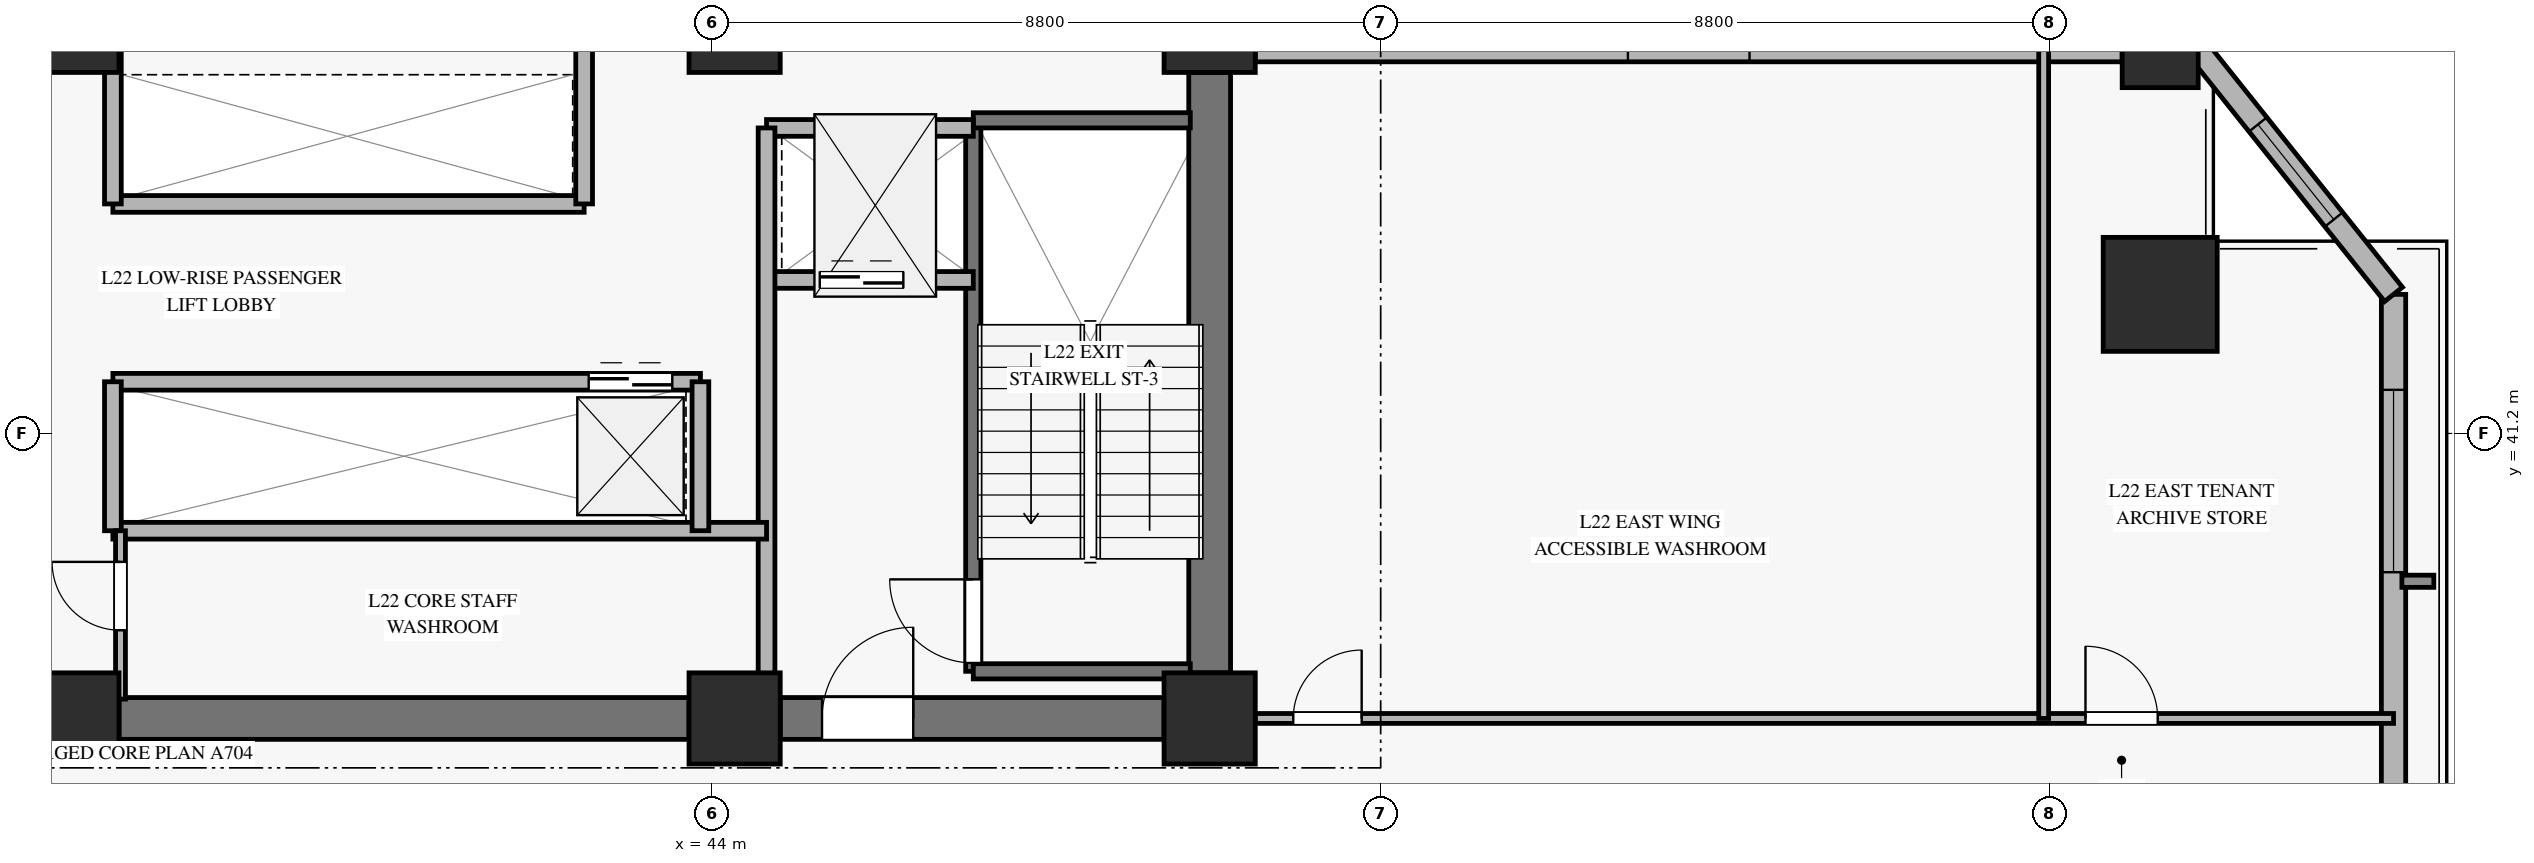
"""IFC4 building model, lengths in metres.
Left out: names, types, materials, properties, quantities, classifications, styles, units other than length and angle.
Written with IfcOpenShell. Run it as: python <this file> out.ifc"""

import sys

from ifc_helpers import new_model, si_unit, direction, frame, frame_2d, origin, origin_2d, place, context, subcontext, project, spatial, rectangle, hollow_rectangle, extrude, source, transform, mapped, element, fill, save


model = new_model("IFC4")
c1 = context("Model", 3, precision=1e-05, world=origin(), true_north=direction((0.0, 1.0)))
c2 = subcontext(c1, "Body", "Model", "MODEL_VIEW")
j1 = project(units=[si_unit("LENGTHUNIT", "METRE"), si_unit("PLANEANGLEUNIT", "RADIAN")], contexts=[c1])
p1 = place(None, origin())
s1 = spatial("IfcSite", under=j1, at=p1, CompositionType="ELEMENT")
p2 = place(p1, origin())
s2 = spatial("IfcBuilding", under=s1, at=p2, CompositionType="ELEMENT")
p3 = place(p2, frame((0.0, 0.0, 91.3)))
s3 = spatial("IfcBuildingStorey", under=s2, at=p3, CompositionType="ELEMENT", Elevation=91.3)
m1 = source(origin(), c2, "Body", "SweptSolid", [
    extrude(rectangle(XDim=1.2, YDim=1.2, at=origin_2d()), origin(), (0.0, 0.0, 1.0), 3.62),
])
for number, where, z_axis, x_axis in (
    (1, (35.6, 37.45, 0.0), (0.0, 0.0, 1.0), (1.0, 0.0, 0.0)),
    (2, (35.6, 46.55, 0.0), (0.0, 0.0, 1.0), (1.0, 0.0, 0.0)),
    (3, (44.3, 37.45, 0.0), (0.0, 0.0, 1.0), (1.0, 0.0, 0.0)),
    (4, (44.3, 46.55, 0.0), (0.0, 0.0, 1.0), (1.0, 0.0, 0.0)),
    (5, (50.55, 37.45, 0.0), (0.0, 0.0, 1.0), (1.0, 0.0, 0.0)),
    (6, (50.55, 46.55, 0.0), (0.0, 0.0, 1.0), (1.0, 0.0, 0.0)),
):
    element("IfcColumn", number, at=place(p3, frame(where, z_axis=z_axis, x_axis=x_axis)), inside=s3, PredefinedType="PILASTER", context=c2, shape_type="MappedRepresentation", body=[
        mapped(m1, transform((0.0, 0.0, 0.0), x_axis=(1.0, 0.0, 0.0), y_axis=(0.0, 1.0, 0.0), z_axis=(0.0, 0.0, 1.0), scale=1.0)),
    ])
p4 = place(p3, frame((36.2, 37.45, 0.0), z_axis=(0.0, 0.0, 1.0), x_axis=(1.0, 0.0, 0.0)))
e7 = element("IfcWall", 7, at=p4, inside=s3, PredefinedType="SHEAR", context=c2, shape_type="SweptSolid", body=[
    extrude(rectangle(XDim=7.5, YDim=0.55, at=frame_2d((3.75, 0.0))), origin(), (0.0, 0.0, 1.0), 3.62),
])
p5 = place(p3, frame((44.9, 37.45, 0.0), z_axis=(0.0, 0.0, 1.0), x_axis=(1.0, 0.0, 0.0)))
e8 = element("IfcWall", 8, at=p5, inside=s3, PredefinedType="SHEAR", context=c2, shape_type="SweptSolid", body=[
    extrude(rectangle(XDim=5.05, YDim=0.55, at=frame_2d((2.525, 0.0))), origin(), (0.0, 0.0, 1.0), 3.62),
])
p6 = place(p5, frame((0.55, 0.0, 0.0)))
e9 = element("IfcOpeningElement", 9, at=p6, cuts=e8, PredefinedType="OPENING", context=c2, shape_type="SweptSolid", body=[
    extrude(rectangle(XDim=1.2, YDim=2.15, at=frame_2d((0.6, 1.075))), frame((0.0, 0.285, 0.0), z_axis=(0.0, -1.0, 0.0), x_axis=(1.0, 0.0, 0.0)), (0.0, 0.0, 1.0), 0.57),
])
p7 = place(p3, frame((50.55, 38.05, 0.0), z_axis=(0.0, 0.0, 1.0), x_axis=(0.0, 1.0, 0.0)))
e10 = element("IfcWall", 10, at=p7, inside=s3, PredefinedType="SHEAR", context=c2, shape_type="SweptSolid", body=[
    extrude(rectangle(XDim=7.9, YDim=0.55, at=frame_2d((3.95, 0.0))), origin(), (0.0, 0.0, 1.0), 3.62),
])
m2 = source(origin(), c2, "Body", "SweptSolid", [
    extrude(hollow_rectangle(XDim=1.5, YDim=1.5, WallThickness=0.07, at=origin_2d()), origin(), (0.0, 0.0, 1.0), 3.62),
])
p8 = place(p3, frame((63.056, 43.03, 0.0), z_axis=(0.0, 0.0, 1.0), x_axis=(1.0, 0.0, 0.0)))
e11 = element("IfcColumn", 11, at=p8, inside=s3, PredefinedType="COLUMN", context=c2, shape_type="MappedRepresentation", body=[
    mapped(m2, transform((0.0, 0.0, 0.0), x_axis=(1.0, 0.0, 0.0), y_axis=(0.0, 1.0, 0.0), z_axis=(0.0, 0.0, 1.0), scale=1.0)),
])
m3 = source(origin(), c2, "Body", "SweptSolid", [
    extrude(hollow_rectangle(XDim=1.0, YDim=1.0, WallThickness=0.045, at=origin_2d()), origin(), (0.0, 0.0, 1.0), 3.62),
])
p9 = place(p3, frame((63.056, 46.25, 0.0), z_axis=(0.0, 0.0, 1.0), x_axis=(1.0, 0.0, 0.0)))
e12 = element("IfcColumn", 12, at=p9, inside=s3, PredefinedType="COLUMN", context=c2, shape_type="MappedRepresentation", body=[
    mapped(m3, transform((0.0, 0.0, 0.0), x_axis=(1.0, 0.0, 0.0), y_axis=(0.0, 1.0, 0.0), z_axis=(0.0, 0.0, 1.0), scale=1.0)),
])
p10 = place(p3, frame((66.126, 26.518, 0.0), z_axis=(0.0, 0.0, 1.0), x_axis=(0.0, 1.0, 0.0)))
e13 = element("IfcWall", 13, at=p10, inside=s3, PredefinedType="SOLIDWALL", context=c2, shape_type="SweptSolid", body=[
    extrude(rectangle(XDim=16.512, YDim=0.32, at=frame_2d((8.256, 0.0))), origin(), (0.0, 0.0, 1.0), 3.1),
])
p11 = place(p10, frame((1.545, 0.0, 0.45)))
e14 = element("IfcOpeningElement", 14, at=p11, cuts=e13, PredefinedType="OPENING", context=c2, shape_type="SweptSolid", body=[
    extrude(rectangle(XDim=2.4, YDim=2.1, at=frame_2d((1.2, 1.05))), frame((0.0, 0.17, 0.0), z_axis=(0.0, -1.0, 0.0), x_axis=(1.0, 0.0, 0.0)), (0.0, 0.0, 1.0), 0.34),
])
p12 = place(p10, frame((12.856, 0.0, 0.45)))
e15 = element("IfcOpeningElement", 15, at=p12, cuts=e13, PredefinedType="OPENING", context=c2, shape_type="SweptSolid", body=[
    extrude(rectangle(XDim=2.4, YDim=2.1, at=frame_2d((1.2, 1.05))), frame((0.0, 0.17, 0.0), z_axis=(0.0, -1.0, 0.0), x_axis=(1.0, 0.0, 0.0)), (0.0, 0.0, 1.0), 0.34),
])
p13 = place(p3, frame((51.15, 46.25, 0.0), z_axis=(0.0, 0.0, 1.0), x_axis=(1.0, 0.0, 0.0)))
e16 = element("IfcWall", 16, at=p13, inside=s3, PredefinedType="SOLIDWALL", context=c2, shape_type="SweptSolid", body=[
    extrude(rectangle(XDim=11.406, YDim=0.32, at=frame_2d((5.703, 0.0))), origin(), (0.0, 0.0, 1.0), 3.1),
])
p14 = place(p13, frame((4.903, 0.0, 0.45)))
e17 = element("IfcOpeningElement", 17, at=p14, cuts=e16, PredefinedType="OPENING", context=c2, shape_type="SweptSolid", body=[
    extrude(rectangle(XDim=1.6, YDim=2.0, at=frame_2d((0.8, 1.0))), frame((0.0, 0.17, 0.0), z_axis=(0.0, -1.0, 0.0), x_axis=(1.0, 0.0, 0.0)), (0.0, 0.0, 1.0), 0.34),
])
p15 = place(p3, frame((66.126, 43.03, 0.0), z_axis=(0.0, 0.0, 1.0), x_axis=(-0.623820223262, 0.781567865926, 0.0)))
e18 = element("IfcWall", 18, at=p15, inside=s3, PredefinedType="SOLIDWALL", context=c2, shape_type="SweptSolid", body=[
    extrude(rectangle(XDim=4.12, YDim=0.3, at=frame_2d((2.06, 0.0))), origin(), (0.0, 0.0, 1.0), 3.1),
])
p16 = place(p15, frame((1.26, 0.0, 0.45)))
e19 = element("IfcOpeningElement", 19, at=p16, cuts=e18, PredefinedType="OPENING", context=c2, shape_type="SweptSolid", body=[
    extrude(rectangle(XDim=1.6, YDim=2.0, at=frame_2d((0.8, 1.0))), frame((0.0, 0.16, 0.0), z_axis=(0.0, -1.0, 0.0), x_axis=(1.0, 0.0, 0.0)), (0.0, 0.0, 1.0), 0.32),
])
p17 = place(p3, frame((47.44, 38.07, 0.0), z_axis=(0.0, 0.0, 1.0), x_axis=(0.0, 1.0, 0.0)))
e20 = element("IfcWall", 20, at=p17, inside=s3, PredefinedType="SOLIDWALL", context=c2, shape_type="SweptSolid", body=[
    extrude(rectangle(XDim=7.25, YDim=0.2, at=frame_2d((3.625, 0.0))), origin(), (0.0, 0.0, 1.0), 3.9),
])
p18 = place(p17, frame((0.11, 0.0, 0.0)))
e21 = element("IfcOpeningElement", 21, at=p18, cuts=e20, PredefinedType="OPENING", context=c2, shape_type="SweptSolid", body=[
    extrude(rectangle(XDim=1.1, YDim=2.15, at=frame_2d((0.55, 1.075))), frame((0.0, 0.11, 0.0), z_axis=(0.0, -1.0, 0.0), x_axis=(1.0, 0.0, 0.0)), (0.0, 0.0, 1.0), 0.22),
])
for number, where, z_axis, x_axis in (
    (22, (47.44, 45.32, 0.0), (0.0, 0.0, 1.0), (1.0, 0.0, 0.0)),
    (23, (47.44, 38.07, 0.0), (0.0, 0.0, 1.0), (1.0, 0.0, 0.0)),
):
    element("IfcWall", number, at=place(p3, frame(where, z_axis=z_axis, x_axis=x_axis)), inside=s3, PredefinedType="SOLIDWALL", context=c2, shape_type="SweptSolid", body=[
        extrude(rectangle(XDim=2.855, YDim=0.2, at=frame_2d((1.427, 0.0))), origin(), (0.0, 0.0, 1.0), 3.9),
    ])
p19 = place(p3, frame((44.72, 43.22, 0.0), z_axis=(0.0, 0.0, 1.0), x_axis=(1.0, 0.0, 0.0)))
e24 = element("IfcWall", 24, at=p19, inside=s3, PredefinedType="SOLIDWALL", context=c2, shape_type="SweptSolid", body=[
    extrude(rectangle(XDim=2.72, YDim=0.22, at=frame_2d((1.36, 0.0))), origin(), (0.0, 0.0, 1.0), 3.62),
])
p20 = place(p19, frame((0.7, 0.0, 0.0)))
e25 = element("IfcOpeningElement", 25, at=p20, cuts=e24, PredefinedType="OPENING", context=c2, shape_type="SweptSolid", body=[
    extrude(rectangle(XDim=1.1, YDim=2.2, at=frame_2d((0.55, 1.1))), frame((0.0, 0.12, 0.0), z_axis=(0.0, -1.0, 0.0), x_axis=(1.0, 0.0, 0.0)), (0.0, 0.0, 1.0), 0.24),
])
p21 = place(p3, frame((44.72, 45.22, 0.0), z_axis=(0.0, 0.0, 1.0), x_axis=(1.0, 0.0, 0.0)))
e26 = element("IfcWall", 26, at=p21, inside=s3, PredefinedType="SOLIDWALL", context=c2, shape_type="SweptSolid", body=[
    extrude(rectangle(XDim=2.72, YDim=0.22, at=frame_2d((1.36, 0.0))), origin(), (0.0, 0.0, 1.0), 3.62),
])
p22 = place(p3, frame((44.72, 37.705, 0.0), z_axis=(0.0, 0.0, 1.0), x_axis=(0.0, 1.0, 0.0)))
e27 = element("IfcWall", 27, at=p22, inside=s3, PredefinedType="SOLIDWALL", context=c2, shape_type="SweptSolid", body=[
    extrude(rectangle(XDim=7.515, YDim=0.22, at=frame_2d((3.757, 0.0))), origin(), (0.0, 0.0, 1.0), 3.62),
])
p23 = place(p3, frame((36.12, 44.22, 0.0), z_axis=(0.0, 0.0, 1.0), x_axis=(1.0, 0.0, 0.0)))
e28 = element("IfcWall", 28, at=p23, inside=s3, PredefinedType="SOLIDWALL", context=c2, shape_type="SweptSolid", body=[
    extrude(rectangle(XDim=6.2, YDim=0.22, at=frame_2d((3.1, 0.0))), origin(), (0.0, 0.0, 1.0), 3.62),
])
for number, where, z_axis, x_axis in (
    (29, (36.12, 44.22, 0.0), (0.0, 0.0, 1.0), (0.0, 1.0, 0.0)),
    (30, (42.32, 44.22, 0.0), (0.0, 0.0, 1.0), (0.0, 1.0, 0.0)),
):
    element("IfcWall", number, at=place(p3, frame(where, z_axis=z_axis, x_axis=x_axis)), inside=s3, PredefinedType="SOLIDWALL", context=c2, shape_type="SweptSolid", body=[
        extrude(rectangle(XDim=2.075, YDim=0.22, at=frame_2d((1.038, 0.0))), origin(), (0.0, 0.0, 1.0), 3.62),
    ])
p24 = place(p3, frame((36.12, 41.88, 0.0), z_axis=(0.0, 0.0, 1.0), x_axis=(1.0, 0.0, 0.0)))
e31 = element("IfcWall", 31, at=p24, inside=s3, PredefinedType="SOLIDWALL", context=c2, shape_type="SweptSolid", body=[
    extrude(rectangle(XDim=7.73, YDim=0.22, at=frame_2d((3.865, 0.0))), origin(), (0.0, 0.0, 1.0), 3.62),
])
p25 = place(p24, frame((6.26, 0.0, 0.0)))
e32 = element("IfcOpeningElement", 32, at=p25, cuts=e31, PredefinedType="OPENING", context=c2, shape_type="SweptSolid", body=[
    extrude(rectangle(XDim=1.1, YDim=2.2, at=frame_2d((0.55, 1.1))), frame((0.0, 0.12, 0.0), z_axis=(0.0, -1.0, 0.0), x_axis=(1.0, 0.0, 0.0)), (0.0, 0.0, 1.0), 0.24),
])
p26 = place(p3, frame((36.12, 39.92, 0.0), z_axis=(0.0, 0.0, 1.0), x_axis=(1.0, 0.0, 0.0)))
e33 = element("IfcWall", 33, at=p26, inside=s3, PredefinedType="SOLIDWALL", context=c2, shape_type="SweptSolid", body=[
    extrude(rectangle(XDim=8.6, YDim=0.22, at=frame_2d((4.3, 0.0))), origin(), (0.0, 0.0, 1.0), 2.905),
])
for number, where, z_axis, x_axis in (
    (34, (36.12, 39.92, 0.0), (0.0, 0.0, 1.0), (0.0, 1.0, 0.0)),
    (35, (43.85, 39.92, 0.0), (0.0, 0.0, 1.0), (0.0, 1.0, 0.0)),
):
    element("IfcWall", number, at=place(p3, frame(where, z_axis=z_axis, x_axis=x_axis)), inside=s3, PredefinedType="SOLIDWALL", context=c2, shape_type="SweptSolid", body=[
        extrude(rectangle(XDim=1.96, YDim=0.22, at=frame_2d((0.98, 0.0))), origin(), (0.0, 0.0, 1.0), 3.62),
    ])
p27 = place(p3, frame((36.22, 37.705, 0.0), z_axis=(0.0, 0.0, 1.0), x_axis=(0.0, 1.0, 0.0)))
e36 = element("IfcWall", 36, at=p27, inside=s3, PredefinedType="PARTITIONING", context=c2, shape_type="SweptSolid", body=[
    extrude(rectangle(XDim=2.215, YDim=0.13, at=frame_2d((1.107, 0.0))), origin(), (0.0, 0.0, 1.0), 3.62),
])
p28 = place(p27, frame((0.905, 0.0, 0.0)))
e37 = element("IfcOpeningElement", 37, at=p28, cuts=e36, PredefinedType="OPENING", context=c2, shape_type="SweptSolid", body=[
    extrude(rectangle(XDim=0.9, YDim=2.1, at=frame_2d((0.45, 1.05))), frame((0.0, 0.075, 0.0), z_axis=(0.0, -1.0, 0.0), x_axis=(1.0, 0.0, 0.0)), (0.0, 0.0, 1.0), 0.15),
])
p29 = place(p3, frame((51.15, 37.45, 0.0), z_axis=(0.0, 0.0, 1.0), x_axis=(1.0, 0.0, 0.0)))
e38 = element("IfcWall", 38, at=p29, inside=s3, PredefinedType="PARTITIONING", context=c2, shape_type="SweptSolid", body=[
    extrude(rectangle(XDim=14.976, YDim=0.13, at=frame_2d((7.488, 0.0))), origin(), (0.0, 0.0, 1.0), 3.105),
])
p30 = place(p29, frame((0.5, 0.0, 0.0)))
e39 = element("IfcOpeningElement", 39, at=p30, cuts=e38, PredefinedType="OPENING", context=c2, shape_type="SweptSolid", body=[
    extrude(rectangle(XDim=0.9, YDim=2.1, at=frame_2d((0.45, 1.05))), frame((0.0, 0.075, 0.0), z_axis=(0.0, -1.0, 0.0), x_axis=(1.0, 0.0, 0.0)), (0.0, 0.0, 1.0), 0.15),
])
p31 = place(p29, frame((10.923, 0.0, 0.0)))
e40 = element("IfcOpeningElement", 40, at=p31, cuts=e38, PredefinedType="OPENING", context=c2, shape_type="SweptSolid", body=[
    extrude(rectangle(XDim=0.95, YDim=2.1, at=frame_2d((0.475, 1.05))), frame((0.0, 0.075, 0.0), z_axis=(0.0, -1.0, 0.0), x_axis=(1.0, 0.0, 0.0)), (0.0, 0.0, 1.0), 0.15),
])
p32 = place(p3, frame((61.523, 37.45, 0.0), z_axis=(0.0, 0.0, 1.0), x_axis=(0.0, 1.0, 0.0)))
e41 = element("IfcWall", 41, at=p32, inside=s3, PredefinedType="PARTITIONING", context=c2, shape_type="SweptSolid", body=[
    extrude(rectangle(XDim=8.8, YDim=0.13, at=frame_2d((4.4, 0.0))), origin(), (0.0, 0.0, 1.0), 3.62),
])
m4 = source(origin(), c2, "Body", "SweptSolid", [
    extrude(rectangle(XDim=2.4, YDim=2.1, at=frame_2d((1.2, 1.05))), frame((0.0, 0.03, 0.0), z_axis=(0.0, -1.0, 0.0), x_axis=(1.0, 0.0, 0.0)), (0.0, 0.0, 1.0), 0.06),
])
p33 = place(p12, origin())
e42 = element("IfcWindow", 42, at=p33, inside=s3, PartitioningType="SINGLE_PANEL", PredefinedType="WINDOW", context=c2, shape_type="MappedRepresentation", body=[
    mapped(m4, transform((0.0, 0.0, 0.0), x_axis=(1.0, 0.0, 0.0), y_axis=(0.0, 1.0, 0.0), z_axis=(0.0, 0.0, 1.0), scale=1.0)),
])
fill(e15, e42)
m5 = source(origin(), c2, "Body", "SweptSolid", [
    extrude(rectangle(XDim=1.6, YDim=2.0, at=frame_2d((0.8, 1.0))), frame((0.0, 0.03, 0.0), z_axis=(0.0, -1.0, 0.0), x_axis=(1.0, 0.0, 0.0)), (0.0, 0.0, 1.0), 0.06),
])
p34 = place(p16, origin())
e43 = element("IfcWindow", 43, at=p34, inside=s3, PartitioningType="SINGLE_PANEL", PredefinedType="WINDOW", context=c2, shape_type="MappedRepresentation", body=[
    mapped(m5, transform((0.0, 0.0, 0.0), x_axis=(1.0, 0.0, 0.0), y_axis=(0.0, 1.0, 0.0), z_axis=(0.0, 0.0, 1.0), scale=1.0)),
])
fill(e19, e43)
m6 = source(origin(), c2, "Body", "SweptSolid", [
    extrude(rectangle(XDim=1.1, YDim=2.15, at=frame_2d((0.55, 1.075))), frame((0.0, 0.025, 0.0), z_axis=(0.0, -1.0, 0.0), x_axis=(1.0, 0.0, 0.0)), (0.0, 0.0, 1.0), 0.05),
])
p35 = place(p18, origin())
e44 = element("IfcDoor", 44, at=p35, inside=s3, OperationType="SINGLE_SWING_RIGHT", PredefinedType="DOOR", context=c2, shape_type="MappedRepresentation", body=[
    mapped(m6, transform((0.0, 0.0, 0.0), x_axis=(1.0, 0.0, 0.0), y_axis=(0.0, 1.0, 0.0), z_axis=(0.0, 0.0, 1.0), scale=1.0)),
])
fill(e21, e44)
m7 = source(origin(), c2, "Body", "SweptSolid", [
    extrude(rectangle(XDim=1.1, YDim=2.2, at=frame_2d((0.55, 1.1))), frame((0.0, 0.025, 0.0), z_axis=(0.0, -1.0, 0.0), x_axis=(1.0, 0.0, 0.0)), (0.0, 0.0, 1.0), 0.05),
])
p36 = place(p20, origin())
e45 = element("IfcDoor", 45, at=p36, inside=s3, OperationType="SLIDING_TO_LEFT", PredefinedType="DOOR", context=c2, shape_type="MappedRepresentation", body=[
    mapped(m7, transform((0.0, 0.0, 0.0), x_axis=(1.0, 0.0, 0.0), y_axis=(0.0, 1.0, 0.0), z_axis=(0.0, 0.0, 1.0), scale=1.0)),
])
fill(e25, e45)
m8 = source(origin(), c2, "Body", "SweptSolid", [
    extrude(rectangle(XDim=1.2, YDim=2.15, at=frame_2d((0.6, 1.075))), frame((0.0, 0.025, 0.0), z_axis=(0.0, -1.0, 0.0), x_axis=(1.0, 0.0, 0.0)), (0.0, 0.0, 1.0), 0.05),
])
p37 = place(p6, origin())
e46 = element("IfcDoor", 46, at=p37, inside=s3, OperationType="SINGLE_SWING_RIGHT", PredefinedType="DOOR", context=c2, shape_type="MappedRepresentation", body=[
    mapped(m8, transform((0.0, 0.0, 0.0), x_axis=(1.0, 0.0, 0.0), y_axis=(0.0, 1.0, 0.0), z_axis=(0.0, 0.0, 1.0), scale=1.0)),
])
fill(e9, e46)
p38 = place(p25, origin())
e47 = element("IfcDoor", 47, at=p38, inside=s3, OperationType="SLIDING_TO_LEFT", PredefinedType="DOOR", context=c2, shape_type="MappedRepresentation", body=[
    mapped(m7, transform((0.0, 0.0, 0.0), x_axis=(1.0, 0.0, 0.0), y_axis=(0.0, 1.0, 0.0), z_axis=(0.0, 0.0, 1.0), scale=1.0)),
])
fill(e32, e47)
m9 = source(origin(), c2, "Body", "SweptSolid", [
    extrude(rectangle(XDim=0.9, YDim=2.1, at=frame_2d((0.45, 1.05))), frame((0.0, 0.025, 0.0), z_axis=(0.0, -1.0, 0.0), x_axis=(1.0, 0.0, 0.0)), (0.0, 0.0, 1.0), 0.05),
])
p39 = place(p28, origin())
e48 = element("IfcDoor", 48, at=p39, inside=s3, OperationType="SINGLE_SWING_RIGHT", PredefinedType="DOOR", context=c2, shape_type="MappedRepresentation", body=[
    mapped(m9, transform((0.0, 0.0, 0.0), x_axis=(1.0, 0.0, 0.0), y_axis=(0.0, 1.0, 0.0), z_axis=(0.0, 0.0, 1.0), scale=1.0)),
])
fill(e37, e48)
p40 = place(p30, origin())
e49 = element("IfcDoor", 49, at=p40, inside=s3, OperationType="SINGLE_SWING_RIGHT", PredefinedType="DOOR", context=c2, shape_type="MappedRepresentation", body=[
    mapped(m9, transform((0.0, 0.0, 0.0), x_axis=(1.0, 0.0, 0.0), y_axis=(0.0, 1.0, 0.0), z_axis=(0.0, 0.0, 1.0), scale=1.0)),
])
fill(e39, e49)
m10 = source(origin(), c2, "Body", "SweptSolid", [
    extrude(rectangle(XDim=0.95, YDim=2.1, at=frame_2d((0.475, 1.05))), frame((0.0, 0.025, 0.0), z_axis=(0.0, -1.0, 0.0), x_axis=(1.0, 0.0, 0.0)), (0.0, 0.0, 1.0), 0.05),
])
p41 = place(p31, origin())
e50 = element("IfcDoor", 50, at=p41, inside=s3, OperationType="SINGLE_SWING_LEFT", PredefinedType="DOOR", context=c2, shape_type="MappedRepresentation", body=[
    mapped(m10, transform((0.0, 0.0, 0.0), x_axis=(1.0, 0.0, 0.0), y_axis=(0.0, 1.0, 0.0), z_axis=(0.0, 0.0, 1.0), scale=1.0)),
])
fill(e40, e50)
save(model, sys.argv[1])
